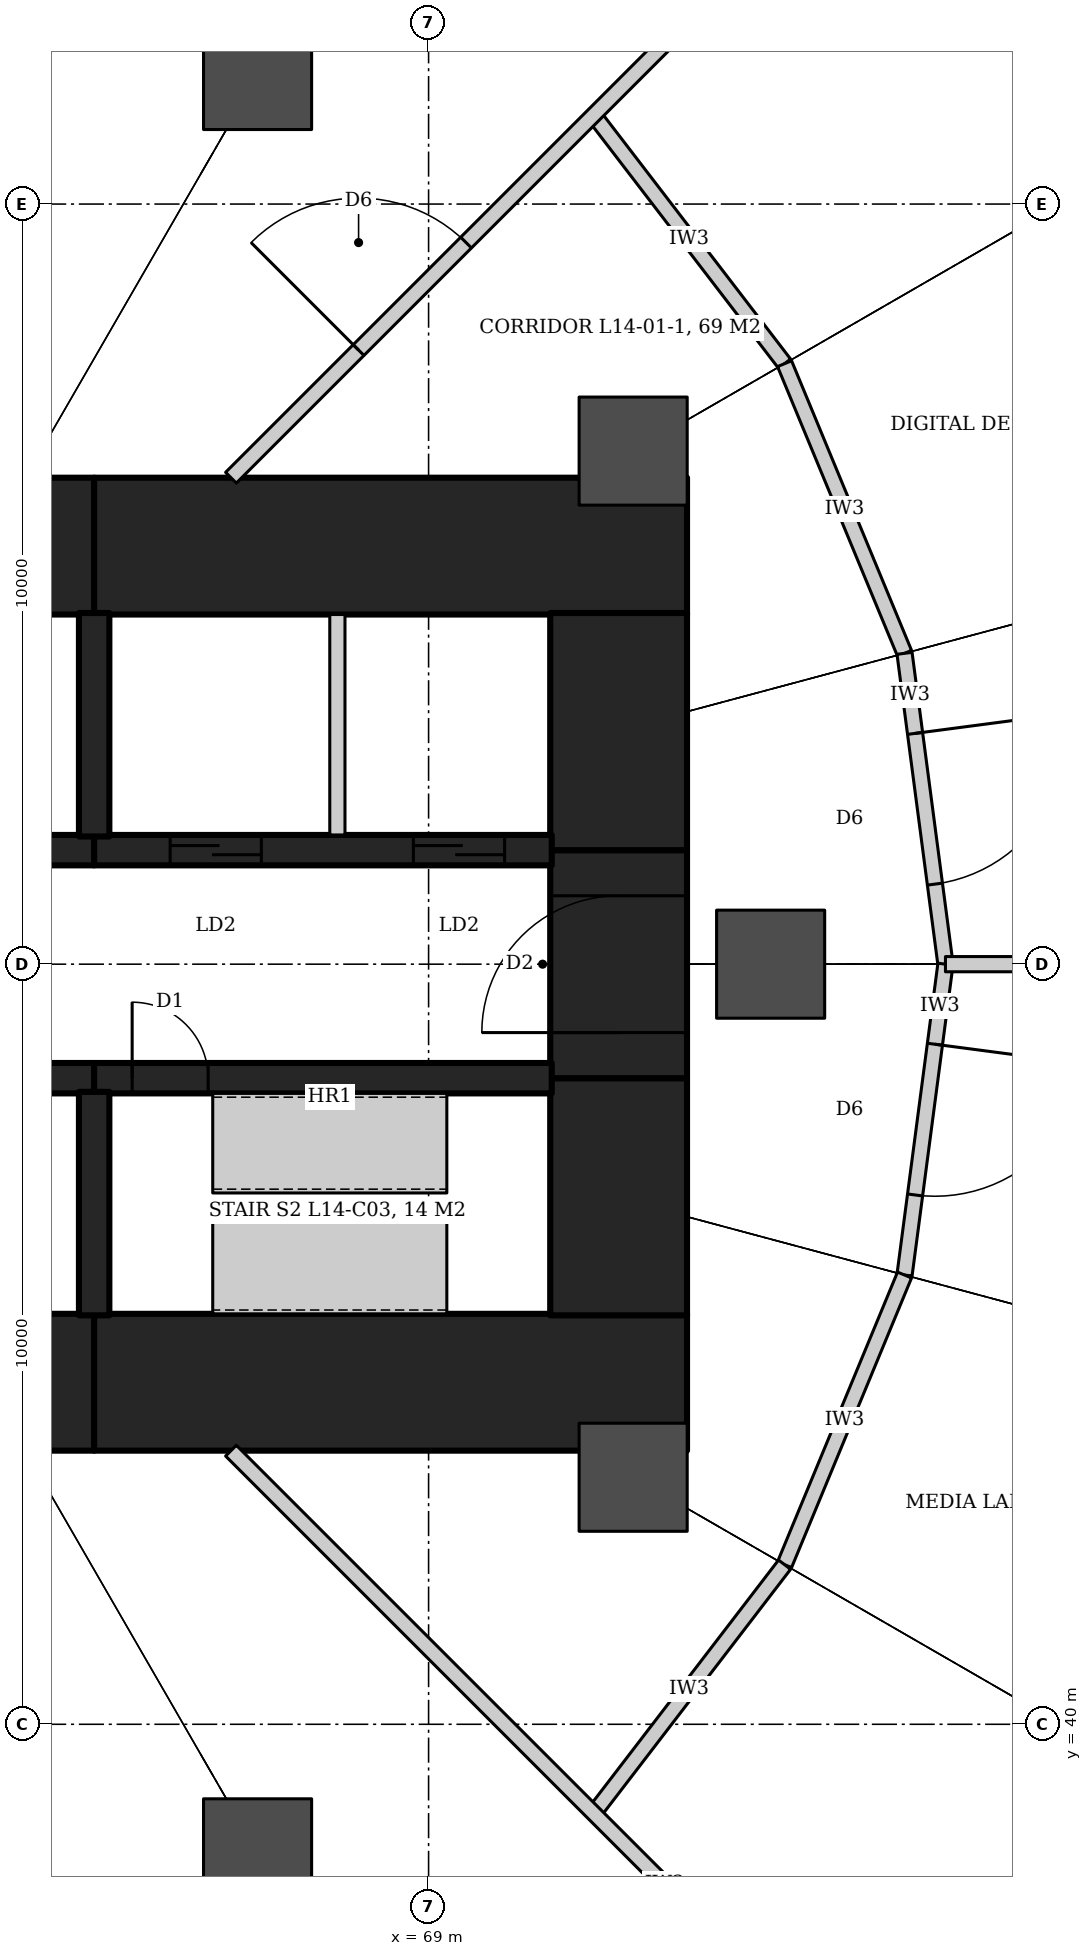
"""IFC4 building model, lengths in metres.
Left out: names, types, materials, properties, quantities, classifications, styles, units other than length and angle.
Written with IfcOpenShell. Run it as: python <this file> out.ifc"""

import sys

from ifc_helpers import new_model, si_unit, direction, frame, frame_2d, origin, origin_2d, place, context, subcontext, project, spatial, rectangle, hollow_circle, extrude, element, fill, save


model = new_model("IFC4")
c1 = context("Model", 3, precision=1e-05, world=origin(), true_north=direction((0.0, 1.0)))
c2 = subcontext(c1, "Body", "Model", "MODEL_VIEW")
j1 = project(units=[si_unit("LENGTHUNIT", "METRE"), si_unit("PLANEANGLEUNIT", "RADIAN")], contexts=[c1])
p1 = place(None, origin())
s1 = spatial("IfcSite", under=j1, at=p1, CompositionType="ELEMENT")
p2 = place(p1, origin())
s2 = spatial("IfcBuilding", under=s1, at=p2, CompositionType="ELEMENT")
p3 = place(p2, frame((0.0, 0.0, 68.0)))
s3 = spatial("IfcBuildingStorey", under=s2, at=p3, CompositionType="ELEMENT", Elevation=68.0)
p4 = place(p3, frame((55.4, 55.5, 0.0), z_axis=(0.0, 0.0, 1.0), x_axis=(1.0, 0.0, 0.0)))
e1 = element("IfcWall", 1, at=p4, inside=s3, PredefinedType="SHEAR", context=c2, shape_type="SweptSolid", body=[
    extrude(rectangle(XDim=9.2, YDim=1.8, at=frame_2d((4.6, 0.0))), origin(), (0.0, 0.0, 1.0), 4.2),
])
p5 = place(p3, frame((64.6, 55.5, 0.0), z_axis=(0.0, 0.0, 1.0), x_axis=(1.0, 0.0, 0.0)))
e2 = element("IfcWall", 2, at=p5, inside=s3, PredefinedType="SHEAR", context=c2, shape_type="SweptSolid", body=[
    extrude(rectangle(XDim=7.8, YDim=1.8, at=frame_2d((3.9, 0.0))), origin(), (0.0, 0.0, 1.0), 4.2),
])
p6 = place(p3, frame((55.4, 44.5, 0.0), z_axis=(0.0, 0.0, 1.0), x_axis=(1.0, 0.0, 0.0)))
e3 = element("IfcWall", 3, at=p6, inside=s3, PredefinedType="SHEAR", context=c2, shape_type="SweptSolid", body=[
    extrude(rectangle(XDim=9.2, YDim=1.8, at=frame_2d((4.6, 0.0))), origin(), (0.0, 0.0, 1.0), 4.2),
])
p7 = place(p3, frame((64.6, 44.5, 0.0), z_axis=(0.0, 0.0, 1.0), x_axis=(1.0, 0.0, 0.0)))
e4 = element("IfcWall", 4, at=p7, inside=s3, PredefinedType="SHEAR", context=c2, shape_type="SweptSolid", body=[
    extrude(rectangle(XDim=7.8, YDim=1.8, at=frame_2d((3.9, 0.0))), origin(), (0.0, 0.0, 1.0), 4.2),
])
p8 = place(p3, frame((71.5, 45.38, 0.0), z_axis=(0.0, 0.0, 1.0), x_axis=(0.0, 1.0, 0.0)))
e5 = element("IfcWall", 5, at=p8, inside=s3, PredefinedType="SHEAR", context=c2, shape_type="SweptSolid", body=[
    extrude(rectangle(XDim=3.12, YDim=1.8, at=frame_2d((1.56, 0.0))), origin(), (0.0, 0.0, 1.0), 4.2),
])
p9 = place(p3, frame((71.5, 48.5, 0.0), z_axis=(0.0, 0.0, 1.0), x_axis=(0.0, 1.0, 0.0)))
e6 = element("IfcWall", 6, at=p9, inside=s3, PredefinedType="SHEAR", context=c2, shape_type="SweptSolid", body=[
    extrude(rectangle(XDim=3.0, YDim=1.8, at=frame_2d((1.5, 0.0))), origin(), (0.0, 0.0, 1.0), 4.2),
])
p10 = place(p9, frame((0.6, 0.0, 0.0)))
e7 = element("IfcOpeningElement", 7, at=p10, cuts=e6, PredefinedType="OPENING", context=c2, shape_type="SweptSolid", body=[
    extrude(rectangle(XDim=1.8, YDim=2.1, at=frame_2d((0.9, 1.05))), frame((0.0, 0.91, 0.0), z_axis=(0.0, -1.0, 0.0), x_axis=(1.0, 0.0, 0.0)), (0.0, 0.0, 1.0), 1.82),
])
p11 = place(p3, frame((71.5, 51.5, 0.0), z_axis=(0.0, 0.0, 1.0), x_axis=(0.0, 1.0, 0.0)))
e8 = element("IfcWall", 8, at=p11, inside=s3, PredefinedType="SHEAR", context=c2, shape_type="SweptSolid", body=[
    extrude(rectangle(XDim=3.12, YDim=1.8, at=frame_2d((1.56, 0.0))), origin(), (0.0, 0.0, 1.0), 4.2),
])
p12 = place(p3, frame((55.4, 51.5, 0.0), z_axis=(0.0, 0.0, 1.0), x_axis=(1.0, 0.0, 0.0)))
e9 = element("IfcWall", 9, at=p12, inside=s3, PredefinedType="SHEAR", context=c2, shape_type="SweptSolid", body=[
    extrude(rectangle(XDim=9.2, YDim=0.4, at=frame_2d((4.6, 0.0))), origin(), (0.0, 0.0, 1.0), 4.2),
])
p13 = place(p12, frame((0.6, 0.0, 0.0)))
e10 = element("IfcOpeningElement", 10, at=p13, cuts=e9, PredefinedType="OPENING", context=c2, shape_type="SweptSolid", body=[
    extrude(rectangle(XDim=1.1, YDim=2.1, at=frame_2d((0.55, 1.05))), frame((0.0, 0.21, 0.0), z_axis=(0.0, -1.0, 0.0), x_axis=(1.0, 0.0, 0.0)), (0.0, 0.0, 1.0), 0.42),
])
p14 = place(p12, frame((2.9, 0.0, 0.0)))
e11 = element("IfcOpeningElement", 11, at=p14, cuts=e9, PredefinedType="OPENING", context=c2, shape_type="SweptSolid", body=[
    extrude(rectangle(XDim=1.1, YDim=2.1, at=frame_2d((0.55, 1.05))), frame((0.0, 0.21, 0.0), z_axis=(0.0, -1.0, 0.0), x_axis=(1.0, 0.0, 0.0)), (0.0, 0.0, 1.0), 0.42),
])
p15 = place(p12, frame((5.2, 0.0, 0.0)))
e12 = element("IfcOpeningElement", 12, at=p15, cuts=e9, PredefinedType="OPENING", context=c2, shape_type="SweptSolid", body=[
    extrude(rectangle(XDim=1.1, YDim=2.1, at=frame_2d((0.55, 1.05))), frame((0.0, 0.21, 0.0), z_axis=(0.0, -1.0, 0.0), x_axis=(1.0, 0.0, 0.0)), (0.0, 0.0, 1.0), 0.42),
])
p16 = place(p12, frame((7.5, 0.0, 0.0)))
e13 = element("IfcOpeningElement", 13, at=p16, cuts=e9, PredefinedType="OPENING", context=c2, shape_type="SweptSolid", body=[
    extrude(rectangle(XDim=1.1, YDim=2.1, at=frame_2d((0.55, 1.05))), frame((0.0, 0.21, 0.0), z_axis=(0.0, -1.0, 0.0), x_axis=(1.0, 0.0, 0.0)), (0.0, 0.0, 1.0), 0.42),
])
p17 = place(p3, frame((64.6, 51.5, 0.0), z_axis=(0.0, 0.0, 1.0), x_axis=(1.0, 0.0, 0.0)))
e14 = element("IfcWall", 14, at=p17, inside=s3, PredefinedType="SHEAR", context=c2, shape_type="SweptSolid", body=[
    extrude(rectangle(XDim=6.02, YDim=0.4, at=frame_2d((3.01, 0.0))), origin(), (0.0, 0.0, 1.0), 4.2),
])
p18 = place(p17, frame((1.0, 0.0, 0.0)))
e15 = element("IfcOpeningElement", 15, at=p18, cuts=e14, PredefinedType="OPENING", context=c2, shape_type="SweptSolid", body=[
    extrude(rectangle(XDim=1.2, YDim=2.1, at=frame_2d((0.6, 1.05))), frame((0.0, 0.21, 0.0), z_axis=(0.0, -1.0, 0.0), x_axis=(1.0, 0.0, 0.0)), (0.0, 0.0, 1.0), 0.42),
])
p19 = place(p17, frame((4.2, 0.0, 0.0)))
e16 = element("IfcOpeningElement", 16, at=p19, cuts=e14, PredefinedType="OPENING", context=c2, shape_type="SweptSolid", body=[
    extrude(rectangle(XDim=1.2, YDim=2.1, at=frame_2d((0.6, 1.05))), frame((0.0, 0.21, 0.0), z_axis=(0.0, -1.0, 0.0), x_axis=(1.0, 0.0, 0.0)), (0.0, 0.0, 1.0), 0.42),
])
p20 = place(p3, frame((55.4, 48.5, 0.0), z_axis=(0.0, 0.0, 1.0), x_axis=(1.0, 0.0, 0.0)))
e17 = element("IfcWall", 17, at=p20, inside=s3, PredefinedType="SHEAR", context=c2, shape_type="SweptSolid", body=[
    extrude(rectangle(XDim=9.2, YDim=0.4, at=frame_2d((4.6, 0.0))), origin(), (0.0, 0.0, 1.0), 4.2),
])
p21 = place(p3, frame((64.6, 48.5, 0.0), z_axis=(0.0, 0.0, 1.0), x_axis=(1.0, 0.0, 0.0)))
e18 = element("IfcWall", 18, at=p21, inside=s3, PredefinedType="SHEAR", context=c2, shape_type="SweptSolid", body=[
    extrude(rectangle(XDim=6.02, YDim=0.4, at=frame_2d((3.01, 0.0))), origin(), (0.0, 0.0, 1.0), 4.2),
])
p22 = place(p21, frame((0.5, 0.0, 0.0)))
e19 = element("IfcOpeningElement", 19, at=p22, cuts=e18, PredefinedType="OPENING", context=c2, shape_type="SweptSolid", body=[
    extrude(rectangle(XDim=1.0, YDim=2.1, at=frame_2d((0.5, 1.05))), frame((0.0, 0.21, 0.0), z_axis=(0.0, -1.0, 0.0), x_axis=(1.0, 0.0, 0.0)), (0.0, 0.0, 1.0), 0.42),
])
for number, where, z_axis, x_axis in (
    (20, (64.6, 51.68, 0.0), (0.0, 0.0, 1.0), (0.0, 1.0, 0.0)),
    (21, (64.6, 48.32, 0.0), (0.0, 0.0, 1.0), (0.0, -1.0, 0.0)),
):
    element("IfcWall", number, at=place(p3, frame(where, z_axis=z_axis, x_axis=x_axis)), inside=s3, PredefinedType="SHEAR", context=c2, shape_type="SweptSolid", body=[
        extrude(rectangle(XDim=2.94, YDim=0.4, at=frame_2d((1.47, 0.0))), origin(), (0.0, 0.0, 1.0), 4.2),
    ])
for number, where, z_axis, x_axis in (
    (22, (73.5, 50.0, 0.0), (0.0, 0.0, 1.0), (1.0, 0.0, 0.0)),
    (23, (71.691, 56.75, 0.0), (0.0, 0.0, 1.0), (1.0, 0.0, 0.0)),
    (24, (66.75, 61.691, 0.0), (0.0, 0.0, 1.0), (1.0, 0.0, 0.0)),
    (25, (66.75, 38.309, 0.0), (0.0, 0.0, 1.0), (1.0, 0.0, 0.0)),
    (26, (71.691, 43.25, 0.0), (0.0, 0.0, 1.0), (1.0, 0.0, 0.0)),
):
    element("IfcColumn", number, at=place(p3, frame(where, z_axis=z_axis, x_axis=x_axis)), inside=s3, PredefinedType="COLUMN", context=c2, shape_type="SweptSolid", body=[
        extrude(hollow_circle(Radius=0.711, WallThickness=0.07, at=origin_2d()), origin(), (0.0, 0.0, 1.0), 4.2),
    ])
p23 = place(p3, frame((71.172, 61.172, 0.0), z_axis=(0.0, 0.0, 1.0), x_axis=(0.608714823874, -0.793389099494, 0.0)))
e27 = element("IfcWall", 27, at=p23, inside=s3, PredefinedType="PARTITIONING", context=c2, shape_type="SweptSolid", body=[
    extrude(rectangle(XDim=4.125, YDim=0.2, at=frame_2d((2.062, 0.0))), origin(), (0.0, 0.0, 1.0), 3.04),
])
p24 = place(p3, frame((73.683, 57.9, 0.0), z_axis=(0.0, 0.0, 1.0), x_axis=(0.382731667114, -0.923859551549, 0.0)))
e28 = element("IfcWall", 28, at=p24, inside=s3, PredefinedType="PARTITIONING", context=c2, shape_type="SweptSolid", body=[
    extrude(rectangle(XDim=4.125, YDim=0.2, at=frame_2d((2.062, 0.0))), origin(), (0.0, 0.0, 1.0), 3.04),
])
p25 = place(p3, frame((75.262, 54.089, 0.0), z_axis=(0.0, 0.0, 1.0), x_axis=(0.130515758099, -0.991446234996, 0.0)))
e29 = element("IfcWall", 29, at=p25, inside=s3, PredefinedType="PARTITIONING", context=c2, shape_type="SweptSolid", body=[
    extrude(rectangle(XDim=4.125, YDim=0.2, at=frame_2d((2.062, 0.0))), origin(), (0.0, 0.0, 1.0), 3.04),
])
p26 = place(p25, frame((1.062, 0.0, 0.0)))
e30 = element("IfcOpeningElement", 30, at=p26, cuts=e29, PredefinedType="OPENING", context=c2, shape_type="SweptSolid", body=[
    extrude(rectangle(XDim=2.0, YDim=2.1, at=frame_2d((1.0, 1.05))), frame((0.0, 0.11, 0.0), z_axis=(0.0, -1.0, 0.0), x_axis=(1.0, 0.0, 0.0)), (0.0, 0.0, 1.0), 0.22),
])
p27 = place(p3, frame((75.8, 50.0, 0.0), z_axis=(0.0, 0.0, 1.0), x_axis=(-0.130515758099, -0.991446234996, 0.0)))
e31 = element("IfcWall", 31, at=p27, inside=s3, PredefinedType="PARTITIONING", context=c2, shape_type="SweptSolid", body=[
    extrude(rectangle(XDim=4.125, YDim=0.2, at=frame_2d((2.062, 0.0))), origin(), (0.0, 0.0, 1.0), 3.04),
])
p28 = place(p27, frame((1.062, 0.0, 0.0)))
e32 = element("IfcOpeningElement", 32, at=p28, cuts=e31, PredefinedType="OPENING", context=c2, shape_type="SweptSolid", body=[
    extrude(rectangle(XDim=2.0, YDim=2.1, at=frame_2d((1.0, 1.05))), frame((0.0, 0.11, 0.0), z_axis=(0.0, -1.0, 0.0), x_axis=(1.0, 0.0, 0.0)), (0.0, 0.0, 1.0), 0.22),
])
p29 = place(p3, frame((75.262, 45.911, 0.0), z_axis=(0.0, 0.0, 1.0), x_axis=(-0.382731667114, -0.923859551549, 0.0)))
e33 = element("IfcWall", 33, at=p29, inside=s3, PredefinedType="PARTITIONING", context=c2, shape_type="SweptSolid", body=[
    extrude(rectangle(XDim=4.125, YDim=0.2, at=frame_2d((2.062, 0.0))), origin(), (0.0, 0.0, 1.0), 3.04),
])
p30 = place(p3, frame((73.683, 42.1, 0.0), z_axis=(0.0, 0.0, 1.0), x_axis=(-0.608714823874, -0.793389099494, 0.0)))
e34 = element("IfcWall", 34, at=p30, inside=s3, PredefinedType="PARTITIONING", context=c2, shape_type="SweptSolid", body=[
    extrude(rectangle(XDim=4.125, YDim=0.2, at=frame_2d((2.062, 0.0))), origin(), (0.0, 0.0, 1.0), 3.04),
])
p31 = place(p3, frame((75.8, 50.0, 0.0), z_axis=(0.0, 0.0, 1.0), x_axis=(1.0, 0.0, 0.0)))
e35 = element("IfcWall", 35, at=p31, inside=s3, PredefinedType="PARTITIONING", context=c2, shape_type="SweptSolid", body=[
    extrude(rectangle(XDim=7.06, YDim=0.2, at=frame_2d((3.53, 0.0))), origin(), (0.0, 0.0, 1.0), 3.04),
])
p32 = place(p3, frame((66.4, 56.4, 0.0), z_axis=(0.0, 0.0, 1.0), x_axis=(0.707106781187, 0.707106781187, 0.0)))
e36 = element("IfcWall", 36, at=p32, inside=s3, PredefinedType="PARTITIONING", context=c2, shape_type="SweptSolid", body=[
    extrude(rectangle(XDim=13.909, YDim=0.2, at=frame_2d((6.955, 0.0))), origin(), (0.0, 0.0, 1.0), 3.02),
])
p33 = place(p32, frame((2.375, 0.0, 0.0)))
e37 = element("IfcOpeningElement", 37, at=p33, cuts=e36, PredefinedType="OPENING", context=c2, shape_type="SweptSolid", body=[
    extrude(rectangle(XDim=2.0, YDim=2.1, at=frame_2d((1.0, 1.05))), frame((0.0, 0.11, 0.0), z_axis=(0.0, -1.0, 0.0), x_axis=(1.0, 0.0, 0.0)), (0.0, 0.0, 1.0), 0.22),
])
p34 = place(p3, frame((66.4, 43.6, 0.0), z_axis=(0.0, 0.0, 1.0), x_axis=(0.707106781187, -0.707106781187, 0.0)))
e38 = element("IfcWall", 38, at=p34, inside=s3, PredefinedType="PARTITIONING", context=c2, shape_type="SweptSolid", body=[
    extrude(rectangle(XDim=13.909, YDim=0.2, at=frame_2d((6.955, 0.0))), origin(), (0.0, 0.0, 1.0), 3.02),
])
p35 = place(p3, frame((67.8, 51.7, 0.0), z_axis=(0.0, 0.0, 1.0), x_axis=(0.0, 1.0, 0.0)))
e39 = element("IfcWall", 39, at=p35, inside=s3, PredefinedType="PARTITIONING", context=c2, shape_type="SweptSolid", body=[
    extrude(rectangle(XDim=2.9, YDim=0.2, at=frame_2d((1.45, 0.0))), origin(), (0.0, 0.0, 1.0), 4.2),
])
p36 = place(p26, origin())
e40 = element("IfcDoor", 40, at=p36, inside=s3, OperationType="DOUBLE_DOOR_DOUBLE_SWING", PredefinedType="DOOR", context=c2, shape_type="SweptSolid", body=[
    extrude(rectangle(XDim=2.0, YDim=2.1, at=frame_2d((1.0, 1.05))), frame((0.0, 0.025, 0.0), z_axis=(0.0, -1.0, 0.0), x_axis=(1.0, 0.0, 0.0)), (0.0, 0.0, 1.0), 0.05),
])
fill(e30, e40)
p37 = place(p33, origin())
e41 = element("IfcDoor", 41, at=p37, inside=s3, OperationType="DOUBLE_DOOR_DOUBLE_SWING", PredefinedType="DOOR", context=c2, shape_type="SweptSolid", body=[
    extrude(rectangle(XDim=2.0, YDim=2.1, at=frame_2d((1.0, 1.05))), frame((0.0, 0.025, 0.0), z_axis=(0.0, -1.0, 0.0), x_axis=(1.0, 0.0, 0.0)), (0.0, 0.0, 1.0), 0.05),
])
fill(e37, e41)
p38 = place(p28, origin())
e42 = element("IfcDoor", 42, at=p38, inside=s3, OperationType="DOUBLE_DOOR_DOUBLE_SWING", PredefinedType="DOOR", context=c2, shape_type="SweptSolid", body=[
    extrude(rectangle(XDim=2.0, YDim=2.1, at=frame_2d((1.0, 1.05))), frame((0.0, 0.025, 0.0), z_axis=(0.0, -1.0, 0.0), x_axis=(1.0, 0.0, 0.0)), (0.0, 0.0, 1.0), 0.05),
])
fill(e32, e42)
p39 = place(p22, origin())
e43 = element("IfcDoor", 43, at=p39, inside=s3, OperationType="SINGLE_SWING_LEFT", PredefinedType="DOOR", context=c2, shape_type="SweptSolid", body=[
    extrude(rectangle(XDim=1.0, YDim=2.1, at=frame_2d((0.5, 1.05))), frame((0.0, 0.025, 0.0), z_axis=(0.0, -1.0, 0.0), x_axis=(1.0, 0.0, 0.0)), (0.0, 0.0, 1.0), 0.05),
])
fill(e19, e43)
p40 = place(p18, origin())
e44 = element("IfcDoor", 44, at=p40, inside=s3, OperationType="SLIDING_TO_LEFT", PredefinedType="DOOR", context=c2, shape_type="SweptSolid", body=[
    extrude(rectangle(XDim=1.2, YDim=2.1, at=frame_2d((0.6, 1.05))), frame((0.0, 0.025, 0.0), z_axis=(0.0, -1.0, 0.0), x_axis=(1.0, 0.0, 0.0)), (0.0, 0.0, 1.0), 0.05),
])
fill(e15, e44)
p41 = place(p19, origin())
e45 = element("IfcDoor", 45, at=p41, inside=s3, OperationType="SLIDING_TO_LEFT", PredefinedType="DOOR", context=c2, shape_type="SweptSolid", body=[
    extrude(rectangle(XDim=1.2, YDim=2.1, at=frame_2d((0.6, 1.05))), frame((0.0, 0.025, 0.0), z_axis=(0.0, -1.0, 0.0), x_axis=(1.0, 0.0, 0.0)), (0.0, 0.0, 1.0), 0.05),
])
fill(e16, e45)
p42 = place(p10, origin())
e46 = element("IfcDoor", 46, at=p42, inside=s3, OperationType="DOUBLE_DOOR_DOUBLE_SWING", PredefinedType="DOOR", context=c2, shape_type="SweptSolid", body=[
    extrude(rectangle(XDim=1.8, YDim=2.1, at=frame_2d((0.9, 1.05))), frame((0.0, 0.025, 0.0), z_axis=(0.0, -1.0, 0.0), x_axis=(1.0, 0.0, 0.0)), (0.0, 0.0, 1.0), 0.05),
])
fill(e7, e46)
save(model, sys.argv[1])
